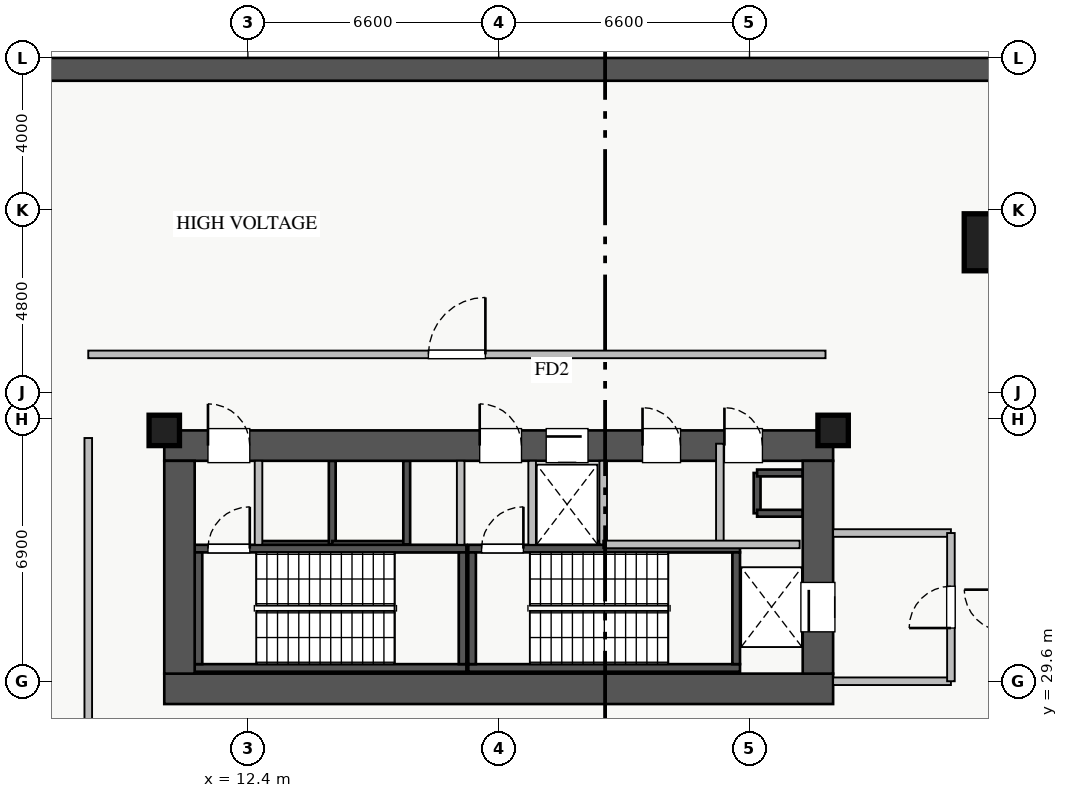
"""IFC4 building model, lengths in metres.
Left out: names, types, materials, properties, quantities, classifications, styles, units other than length and angle.
Written with IfcOpenShell. Run it as: python <this file> out.ifc"""

import sys

from ifc_helpers import new_model, si_unit, direction, frame, frame_2d, origin, origin_2d, place, context, subcontext, project, spatial, rectangle, extrude, source, transform, mapped, element, fill, save


model = new_model("IFC4")
c1 = context("Model", 3, precision=1e-05, world=origin(), true_north=direction((0.0, 1.0)))
c2 = subcontext(c1, "Body", "Model", "MODEL_VIEW")
j1 = project(units=[si_unit("LENGTHUNIT", "METRE"), si_unit("PLANEANGLEUNIT", "RADIAN")], contexts=[c1])
p1 = place(None, origin())
s1 = spatial("IfcSite", under=j1, at=p1, CompositionType="ELEMENT")
p2 = place(p1, origin())
s2 = spatial("IfcBuilding", under=s1, at=p2, CompositionType="ELEMENT")
p3 = place(p2, frame((0.0, 0.0, -9.6)))
s3 = spatial("IfcBuildingStorey", under=s2, at=p3, CompositionType="ELEMENT", Elevation=-9.6)
p4 = place(p3, frame((12.68, 33.2, 0.0), z_axis=(0.0, 0.0, 1.0), x_axis=(1.0, 0.0, 0.0)))
e1 = element("IfcWall", 1, at=p4, inside=s3, PredefinedType="SHEAR", context=c2, shape_type="SweptSolid", body=[
    extrude(rectangle(XDim=1.94, YDim=0.18, at=frame_2d((0.97, 0.0))), origin(), (0.0, 0.0, 1.0), 4.58),
])
p5 = place(p3, frame((14.62, 33.2, 0.0), z_axis=(0.0, 0.0, 1.0), x_axis=(0.0, 1.0, 0.0)))
e2 = element("IfcWall", 2, at=p5, inside=s3, PredefinedType="SHEAR", context=c2, shape_type="SweptSolid", body=[
    extrude(rectangle(XDim=2.2, YDim=0.18, at=frame_2d((1.1, 0.0))), origin(), (0.0, 0.0, 1.0), 4.58),
])
p6 = place(p3, frame((25.8, 34.02, 0.0), z_axis=(0.0, 0.0, 1.0), x_axis=(0.0, 1.0, 0.0)))
e3 = element("IfcWall", 3, at=p6, inside=s3, PredefinedType="SHEAR", context=c2, shape_type="SweptSolid", body=[
    extrude(rectangle(XDim=1.06, YDim=0.18, at=frame_2d((0.53, 0.0))), origin(), (0.0, 0.0, 1.0), 4.58),
])
for number, where, z_axis, x_axis in (
    (4, (25.8, 35.08, 0.0), (0.0, 0.0, 1.0), (1.0, 0.0, 0.0)),
    (5, (25.8, 34.02, 0.0), (0.0, 0.0, 1.0), (1.0, 0.0, 0.0)),
):
    element("IfcWall", number, at=place(p3, frame(where, z_axis=z_axis, x_axis=x_axis)), inside=s3, PredefinedType="SHEAR", context=c2, shape_type="SweptSolid", body=[
        extrude(rectangle(XDim=1.2, YDim=0.18, at=frame_2d((0.6, 0.0))), origin(), (0.0, 0.0, 1.0), 4.58),
    ])
p7 = place(p3, frame((14.62, 33.2, 0.0), z_axis=(0.0, 0.0, 1.0), x_axis=(1.0, 0.0, 0.0)))
e6 = element("IfcWall", 6, at=p7, inside=s3, PredefinedType="SHEAR", context=c2, shape_type="SweptSolid", body=[
    extrude(rectangle(XDim=1.96, YDim=0.18, at=frame_2d((0.98, 0.0))), origin(), (0.0, 0.0, 1.0), 4.58),
])
p8 = place(p3, frame((16.58, 33.2, 0.0), z_axis=(0.0, 0.0, 1.0), x_axis=(0.0, 1.0, 0.0)))
e7 = element("IfcWall", 7, at=p8, inside=s3, PredefinedType="SHEAR", context=c2, shape_type="SweptSolid", body=[
    extrude(rectangle(XDim=2.2, YDim=0.18, at=frame_2d((1.1, 0.0))), origin(), (0.0, 0.0, 1.0), 4.58),
])
p9 = place(p3, frame((19.88, 33.2, 0.0), z_axis=(0.0, 0.0, 1.0), x_axis=(1.0, 0.0, 0.0)))
e8 = element("IfcWall", 8, at=p9, inside=s3, PredefinedType="SHEAR", context=c2, shape_type="SweptSolid", body=[
    extrude(rectangle(XDim=1.87, YDim=0.18, at=frame_2d((0.935, 0.0))), origin(), (0.0, 0.0, 1.0), 4.58),
])
p10 = place(p3, frame((11.0, 29.95, 0.0), z_axis=(0.0, 0.0, 1.0), x_axis=(1.0, 0.0, 0.0)))
e9 = element("IfcWall", 9, at=p10, inside=s3, PredefinedType="SHEAR", context=c2, shape_type="SweptSolid", body=[
    extrude(rectangle(XDim=7.15, YDim=0.2, at=frame_2d((3.575, 0.0))), origin(), (0.0, 0.0, 1.0), 4.8),
])
p11 = place(p3, frame((11.0, 33.09, 0.0), z_axis=(0.0, 0.0, 1.0), x_axis=(1.0, 0.0, 0.0)))
e10 = element("IfcWall", 10, at=p11, inside=s3, PredefinedType="SHEAR", context=c2, shape_type="SweptSolid", body=[
    extrude(rectangle(XDim=7.15, YDim=0.2, at=frame_2d((3.575, 0.0))), origin(), (0.0, 0.0, 1.0), 4.8),
])
p12 = place(p11, frame((0.35, 0.0, 0.0)))
e11 = element("IfcOpeningElement", 11, at=p12, cuts=e10, PredefinedType="OPENING", context=c2, shape_type="SweptSolid", body=[
    extrude(rectangle(XDim=1.1, YDim=2.05, at=frame_2d((0.55, 1.025))), frame((0.0, 0.11, 0.0), z_axis=(0.0, -1.0, 0.0), x_axis=(1.0, 0.0, 0.0)), (0.0, 0.0, 1.0), 0.22),
])
for number, where, z_axis, x_axis in (
    (12, (11.1, 30.05, 0.0), (0.0, 0.0, 1.0), (0.0, 1.0, 0.0)),
    (13, (18.05, 30.05, 0.0), (0.0, 0.0, 1.0), (0.0, 1.0, 0.0)),
):
    element("IfcWall", number, at=place(p3, frame(where, z_axis=z_axis, x_axis=x_axis)), inside=s3, PredefinedType="SHEAR", context=c2, shape_type="SweptSolid", body=[
        extrude(rectangle(XDim=2.94, YDim=0.2, at=frame_2d((1.47, 0.0))), origin(), (0.0, 0.0, 1.0), 4.8),
    ])
p13 = place(p3, frame((18.2, 29.95, 0.0), z_axis=(0.0, 0.0, 1.0), x_axis=(1.0, 0.0, 0.0)))
e14 = element("IfcWall", 14, at=p13, inside=s3, PredefinedType="SHEAR", context=c2, shape_type="SweptSolid", body=[
    extrude(rectangle(XDim=7.15, YDim=0.2, at=frame_2d((3.575, 0.0))), origin(), (0.0, 0.0, 1.0), 4.8),
])
p14 = place(p3, frame((18.2, 33.09, 0.0), z_axis=(0.0, 0.0, 1.0), x_axis=(1.0, 0.0, 0.0)))
e15 = element("IfcWall", 15, at=p14, inside=s3, PredefinedType="SHEAR", context=c2, shape_type="SweptSolid", body=[
    extrude(rectangle(XDim=7.15, YDim=0.2, at=frame_2d((3.575, 0.0))), origin(), (0.0, 0.0, 1.0), 4.8),
])
p15 = place(p14, frame((0.35, 0.0, 0.0)))
e16 = element("IfcOpeningElement", 16, at=p15, cuts=e15, PredefinedType="OPENING", context=c2, shape_type="SweptSolid", body=[
    extrude(rectangle(XDim=1.1, YDim=2.05, at=frame_2d((0.55, 1.025))), frame((0.0, 0.11, 0.0), z_axis=(0.0, -1.0, 0.0), x_axis=(1.0, 0.0, 0.0)), (0.0, 0.0, 1.0), 0.22),
])
for number, where, z_axis, x_axis in (
    (17, (18.3, 30.05, 0.0), (0.0, 0.0, 1.0), (0.0, 1.0, 0.0)),
    (18, (25.25, 30.05, 0.0), (0.0, 0.0, 1.0), (0.0, 1.0, 0.0)),
):
    element("IfcWall", number, at=place(p3, frame(where, z_axis=z_axis, x_axis=x_axis)), inside=s3, PredefinedType="SHEAR", context=c2, shape_type="SweptSolid", body=[
        extrude(rectangle(XDim=2.94, YDim=0.2, at=frame_2d((1.47, 0.0))), origin(), (0.0, 0.0, 1.0), 4.8),
    ])
p16 = place(p3, frame((0.0, 45.7, 0.0), z_axis=(0.0, 0.0, 1.0), x_axis=(1.0, 0.0, 0.0)))
e19 = element("IfcWall", 19, at=p16, inside=s3, PredefinedType="SOLIDWALL", context=c2, shape_type="SweptSolid", body=[
    extrude(rectangle(XDim=74.0, YDim=0.6, at=frame_2d((37.0, 0.0))), origin(), (0.0, 0.0, 1.0), 4.8),
])
p17 = place(p3, frame((10.2, 29.4, 0.0), z_axis=(0.0, 0.0, 1.0), x_axis=(1.0, 0.0, 0.0)))
e20 = element("IfcWall", 20, at=p17, inside=s3, PredefinedType="SHEAR", context=c2, shape_type="SweptSolid", body=[
    extrude(rectangle(XDim=17.6, YDim=0.8, at=frame_2d((8.8, 0.0))), origin(), (0.0, 0.0, 1.0), 4.8),
])
p18 = place(p3, frame((10.2, 35.8, 0.0), z_axis=(0.0, 0.0, 1.0), x_axis=(1.0, 0.0, 0.0)))
e21 = element("IfcWall", 21, at=p18, inside=s3, PredefinedType="SHEAR", context=c2, shape_type="SweptSolid", body=[
    extrude(rectangle(XDim=17.6, YDim=0.8, at=frame_2d((8.8, 0.0))), origin(), (0.0, 0.0, 1.0), 4.8),
])
p19 = place(p18, frame((1.15, 0.0, 0.0)))
e22 = element("IfcOpeningElement", 22, at=p19, cuts=e21, PredefinedType="OPENING", context=c2, shape_type="SweptSolid", body=[
    extrude(rectangle(XDim=1.1, YDim=2.05, at=frame_2d((0.55, 1.025))), frame((0.0, 0.41, 0.0), z_axis=(0.0, -1.0, 0.0), x_axis=(1.0, 0.0, 0.0)), (0.0, 0.0, 1.0), 0.82),
])
p20 = place(p18, frame((8.3, 0.0, 0.0)))
e23 = element("IfcOpeningElement", 23, at=p20, cuts=e21, PredefinedType="OPENING", context=c2, shape_type="SweptSolid", body=[
    extrude(rectangle(XDim=1.1, YDim=2.05, at=frame_2d((0.55, 1.025))), frame((0.0, 0.41, 0.0), z_axis=(0.0, -1.0, 0.0), x_axis=(1.0, 0.0, 0.0)), (0.0, 0.0, 1.0), 0.82),
])
p21 = place(p18, frame((10.05, 0.0, 0.0)))
e24 = element("IfcOpeningElement", 24, at=p21, cuts=e21, PredefinedType="OPENING", context=c2, shape_type="SweptSolid", body=[
    extrude(rectangle(XDim=1.1, YDim=2.05, at=frame_2d((0.55, 1.025))), frame((0.0, 0.41, 0.0), z_axis=(0.0, -1.0, 0.0), x_axis=(1.0, 0.0, 0.0)), (0.0, 0.0, 1.0), 0.82),
])
p22 = place(p18, frame((14.74, 0.0, 0.0)))
e25 = element("IfcOpeningElement", 25, at=p22, cuts=e21, PredefinedType="OPENING", context=c2, shape_type="SweptSolid", body=[
    extrude(rectangle(XDim=1.0, YDim=2.05, at=frame_2d((0.5, 1.025))), frame((0.0, 0.41, 0.0), z_axis=(0.0, -1.0, 0.0), x_axis=(1.0, 0.0, 0.0)), (0.0, 0.0, 1.0), 0.82),
])
p23 = place(p18, frame((12.585, 0.0, 0.0)))
e26 = element("IfcOpeningElement", 26, at=p23, cuts=e21, PredefinedType="OPENING", context=c2, shape_type="SweptSolid", body=[
    extrude(rectangle(XDim=1.0, YDim=2.05, at=frame_2d((0.5, 1.025))), frame((0.0, 0.41, 0.0), z_axis=(0.0, -1.0, 0.0), x_axis=(1.0, 0.0, 0.0)), (0.0, 0.0, 1.0), 0.82),
])
p24 = place(p3, frame((10.6, 29.8, 0.0), z_axis=(0.0, 0.0, 1.0), x_axis=(0.0, 1.0, 0.0)))
e27 = element("IfcWall", 27, at=p24, inside=s3, PredefinedType="SHEAR", context=c2, shape_type="SweptSolid", body=[
    extrude(rectangle(XDim=5.6, YDim=0.8, at=frame_2d((2.8, 0.0))), origin(), (0.0, 0.0, 1.0), 4.8),
])
p25 = place(p3, frame((27.4, 29.8, 0.0), z_axis=(0.0, 0.0, 1.0), x_axis=(0.0, 1.0, 0.0)))
e28 = element("IfcWall", 28, at=p25, inside=s3, PredefinedType="SHEAR", context=c2, shape_type="SweptSolid", body=[
    extrude(rectangle(XDim=5.6, YDim=0.8, at=frame_2d((2.8, 0.0))), origin(), (0.0, 0.0, 1.0), 4.8),
])
p26 = place(p25, frame((1.1, 0.0, 0.0)))
e29 = element("IfcOpeningElement", 29, at=p26, cuts=e28, PredefinedType="OPENING", context=c2, shape_type="SweptSolid", body=[
    extrude(rectangle(XDim=1.3, YDim=2.05, at=frame_2d((0.65, 1.025))), frame((0.0, 0.41, 0.0), z_axis=(0.0, -1.0, 0.0), x_axis=(1.0, 0.0, 0.0)), (0.0, 0.0, 1.0), 0.82),
])
m1 = source(origin(), c2, "Body", "SweptSolid", [
    extrude(rectangle(XDim=1.5, YDim=1.5, at=origin_2d()), origin(), (0.0, 0.0, 1.0), 4.8),
])
p27 = place(p3, frame((32.0, 41.15, 0.0), z_axis=(0.0, 0.0, 1.0), x_axis=(1.0, 0.0, 0.0)))
e30 = element("IfcColumn", 30, at=p27, inside=s3, PredefinedType="COLUMN", context=c2, shape_type="MappedRepresentation", body=[
    mapped(m1, transform((0.0, 0.0, 0.0), x_axis=(1.0, 0.0, 0.0), y_axis=(0.0, 1.0, 0.0), z_axis=(0.0, 0.0, 1.0), scale=1.0)),
])
m2 = source(origin(), c2, "Body", "SweptSolid", [
    extrude(rectangle(XDim=0.8, YDim=0.8, at=origin_2d()), origin(), (0.0, 0.0, 1.0), 4.8),
])
for number, where, z_axis, x_axis in (
    (31, (10.2, 36.2, 0.0), (0.0, 0.0, 1.0), (1.0, 0.0, 0.0)),
    (32, (27.8, 36.2, 0.0), (0.0, 0.0, 1.0), (1.0, 0.0, 0.0)),
):
    element("IfcColumn", number, at=place(p3, frame(where, z_axis=z_axis, x_axis=x_axis)), inside=s3, PredefinedType="PILASTER", context=c2, shape_type="MappedRepresentation", body=[
        mapped(m2, transform((0.0, 0.0, 0.0), x_axis=(1.0, 0.0, 0.0), y_axis=(0.0, 1.0, 0.0), z_axis=(0.0, 0.0, 1.0), scale=1.0)),
    ])
p28 = place(p3, frame((27.8, 29.6, 0.0), z_axis=(0.0, 0.0, 1.0), x_axis=(1.0, 0.0, 0.0)))
e33 = element("IfcWall", 33, at=p28, inside=s3, PredefinedType="PARTITIONING", context=c2, shape_type="SweptSolid", body=[
    extrude(rectangle(XDim=3.1, YDim=0.2, at=frame_2d((1.55, 0.0))), origin(), (0.0, 0.0, 1.0), 3.875),
])
p29 = place(p3, frame((27.8, 33.5, 0.0), z_axis=(0.0, 0.0, 1.0), x_axis=(1.0, 0.0, 0.0)))
e34 = element("IfcWall", 34, at=p29, inside=s3, PredefinedType="PARTITIONING", context=c2, shape_type="SweptSolid", body=[
    extrude(rectangle(XDim=3.1, YDim=0.2, at=frame_2d((1.55, 0.0))), origin(), (0.0, 0.0, 1.0), 3.575),
])
p30 = place(p3, frame((30.9, 29.6, 0.0), z_axis=(0.0, 0.0, 1.0), x_axis=(0.0, 1.0, 0.0)))
e35 = element("IfcWall", 35, at=p30, inside=s3, PredefinedType="PARTITIONING", context=c2, shape_type="SweptSolid", body=[
    extrude(rectangle(XDim=3.9, YDim=0.2, at=frame_2d((1.95, 0.0))), origin(), (0.0, 0.0, 1.0), 4.58),
])
p31 = place(p30, frame((1.4, 0.0, 0.0)))
e36 = element("IfcOpeningElement", 36, at=p31, cuts=e35, PredefinedType="OPENING", context=c2, shape_type="SweptSolid", body=[
    extrude(rectangle(XDim=1.1, YDim=2.05, at=frame_2d((0.55, 1.025))), frame((0.0, 0.11, 0.0), z_axis=(0.0, -1.0, 0.0), x_axis=(1.0, 0.0, 0.0)), (0.0, 0.0, 1.0), 0.22),
])
for number, where, z_axis, x_axis in (
    (37, (12.68, 33.19, 0.0), (0.0, 0.0, 1.0), (0.0, 1.0, 0.0)),
    (38, (18.0, 33.19, 0.0), (0.0, 0.0, 1.0), (0.0, 1.0, 0.0)),
    (39, (19.88, 33.19, 0.0), (0.0, 0.0, 1.0), (0.0, 1.0, 0.0)),
):
    element("IfcWall", number, at=place(p3, frame(where, z_axis=z_axis, x_axis=x_axis)), inside=s3, PredefinedType="PARTITIONING", context=c2, shape_type="SweptSolid", body=[
        extrude(rectangle(XDim=2.21, YDim=0.2, at=frame_2d((1.105, 0.0))), origin(), (0.0, 0.0, 1.0), 4.58),
    ])
p32 = place(p3, frame((24.82, 33.2, 0.0), z_axis=(0.0, 0.0, 1.0), x_axis=(0.0, 1.0, 0.0)))
e40 = element("IfcWall", 40, at=p32, inside=s3, PredefinedType="PARTITIONING", context=c2, shape_type="SweptSolid", body=[
    extrude(rectangle(XDim=2.65, YDim=0.2, at=frame_2d((1.325, 0.0))), origin(), (0.0, 0.0, 1.0), 4.58),
])
p33 = place(p3, frame((21.75, 33.2, 0.0), z_axis=(0.0, 0.0, 1.0), x_axis=(0.0, 1.0, 0.0)))
e41 = element("IfcWall", 41, at=p33, inside=s3, PredefinedType="PARTITIONING", context=c2, shape_type="SweptSolid", body=[
    extrude(rectangle(XDim=2.2, YDim=0.2, at=frame_2d((1.1, 0.0))), origin(), (0.0, 0.0, 1.0), 4.58),
])
p34 = place(p3, frame((21.75, 33.2, 0.0), z_axis=(0.0, 0.0, 1.0), x_axis=(1.0, 0.0, 0.0)))
e42 = element("IfcWall", 42, at=p34, inside=s3, PredefinedType="PARTITIONING", context=c2, shape_type="SweptSolid", body=[
    extrude(rectangle(XDim=5.17, YDim=0.2, at=frame_2d((2.585, 0.0))), origin(), (0.0, 0.0, 1.0), 4.58),
])
p35 = place(p3, frame((8.2, 10.0, 0.0), z_axis=(0.0, 0.0, 1.0), x_axis=(0.0, 1.0, 0.0)))
e43 = element("IfcWall", 43, at=p35, inside=s3, PredefinedType="PARTITIONING", context=c2, shape_type="SweptSolid", body=[
    extrude(rectangle(XDim=26.0, YDim=0.2, at=frame_2d((13.0, 0.0))), origin(), (0.0, 0.0, 1.0), 4.58),
])
p36 = place(p35, frame((12.25, 0.0, 0.0)))
e44 = element("IfcOpeningElement", 44, at=p36, cuts=e43, PredefinedType="OPENING", context=c2, shape_type="SweptSolid", body=[
    extrude(rectangle(XDim=1.5, YDim=2.05, at=frame_2d((0.75, 1.025))), frame((0.0, 0.11, 0.0), z_axis=(0.0, -1.0, 0.0), x_axis=(1.0, 0.0, 0.0)), (0.0, 0.0, 1.0), 0.22),
])
p37 = place(p3, frame((8.2, 38.2, 0.0), z_axis=(0.0, 0.0, 1.0), x_axis=(1.0, 0.0, 0.0)))
e45 = element("IfcWall", 45, at=p37, inside=s3, PredefinedType="PARTITIONING", context=c2, shape_type="SweptSolid", body=[
    extrude(rectangle(XDim=19.4, YDim=0.2, at=frame_2d((9.7, 0.0))), origin(), (0.0, 0.0, 1.0), 4.58),
])
p38 = place(p37, frame((8.95, 0.0, 0.0)))
e46 = element("IfcOpeningElement", 46, at=p38, cuts=e45, PredefinedType="OPENING", context=c2, shape_type="SweptSolid", body=[
    extrude(rectangle(XDim=1.5, YDim=2.05, at=frame_2d((0.75, 1.025))), frame((0.0, 0.11, 0.0), z_axis=(0.0, -1.0, 0.0), x_axis=(1.0, 0.0, 0.0)), (0.0, 0.0, 1.0), 0.22),
])
m3 = source(origin(), c2, "Body", "SweptSolid", [
    extrude(rectangle(XDim=1.3, YDim=2.05, at=frame_2d((0.65, 1.025))), frame((0.0, 0.025, 0.0), z_axis=(0.0, -1.0, 0.0), x_axis=(1.0, 0.0, 0.0)), (0.0, 0.0, 1.0), 0.05),
])
p39 = place(p26, origin())
e47 = element("IfcDoor", 47, at=p39, inside=s3, OperationType="SLIDING_TO_LEFT", PredefinedType="DOOR", context=c2, shape_type="MappedRepresentation", body=[
    mapped(m3, transform((0.0, 0.0, 0.0), x_axis=(1.0, 0.0, 0.0), y_axis=(0.0, 1.0, 0.0), z_axis=(0.0, 0.0, 1.0), scale=1.0)),
])
fill(e29, e47)
m4 = source(origin(), c2, "Body", "SweptSolid", [
    extrude(rectangle(XDim=1.1, YDim=2.05, at=frame_2d((0.55, 1.025))), frame((0.0, 0.025, 0.0), z_axis=(0.0, -1.0, 0.0), x_axis=(1.0, 0.0, 0.0)), (0.0, 0.0, 1.0), 0.05),
])
p40 = place(p19, origin())
e48 = element("IfcDoor", 48, at=p40, inside=s3, OperationType="SINGLE_SWING_LEFT", PredefinedType="DOOR", context=c2, shape_type="MappedRepresentation", body=[
    mapped(m4, transform((0.0, 0.0, 0.0), x_axis=(1.0, 0.0, 0.0), y_axis=(0.0, 1.0, 0.0), z_axis=(0.0, 0.0, 1.0), scale=1.0)),
])
fill(e22, e48)
p41 = place(p12, origin())
e49 = element("IfcDoor", 49, at=p41, inside=s3, OperationType="SINGLE_SWING_RIGHT", PredefinedType="DOOR", context=c2, shape_type="MappedRepresentation", body=[
    mapped(m4, transform((0.0, 0.0, 0.0), x_axis=(1.0, 0.0, 0.0), y_axis=(0.0, 1.0, 0.0), z_axis=(0.0, 0.0, 1.0), scale=1.0)),
])
fill(e11, e49)
p42 = place(p20, origin())
e50 = element("IfcDoor", 50, at=p42, inside=s3, OperationType="SINGLE_SWING_LEFT", PredefinedType="DOOR", context=c2, shape_type="MappedRepresentation", body=[
    mapped(m4, transform((0.0, 0.0, 0.0), x_axis=(1.0, 0.0, 0.0), y_axis=(0.0, 1.0, 0.0), z_axis=(0.0, 0.0, 1.0), scale=1.0)),
])
fill(e23, e50)
p43 = place(p15, origin())
e51 = element("IfcDoor", 51, at=p43, inside=s3, OperationType="SINGLE_SWING_RIGHT", PredefinedType="DOOR", context=c2, shape_type="MappedRepresentation", body=[
    mapped(m4, transform((0.0, 0.0, 0.0), x_axis=(1.0, 0.0, 0.0), y_axis=(0.0, 1.0, 0.0), z_axis=(0.0, 0.0, 1.0), scale=1.0)),
])
fill(e16, e51)
p44 = place(p21, origin())
e52 = element("IfcDoor", 52, at=p44, inside=s3, OperationType="SLIDING_TO_LEFT", PredefinedType="DOOR", context=c2, shape_type="MappedRepresentation", body=[
    mapped(m4, transform((0.0, 0.0, 0.0), x_axis=(1.0, 0.0, 0.0), y_axis=(0.0, 1.0, 0.0), z_axis=(0.0, 0.0, 1.0), scale=1.0)),
])
fill(e24, e52)
m5 = source(origin(), c2, "Body", "SweptSolid", [
    extrude(rectangle(XDim=1.0, YDim=2.05, at=frame_2d((0.5, 1.025))), frame((0.0, 0.025, 0.0), z_axis=(0.0, -1.0, 0.0), x_axis=(1.0, 0.0, 0.0)), (0.0, 0.0, 1.0), 0.05),
])
p45 = place(p22, origin())
e53 = element("IfcDoor", 53, at=p45, inside=s3, OperationType="SINGLE_SWING_LEFT", PredefinedType="DOOR", context=c2, shape_type="MappedRepresentation", body=[
    mapped(m5, transform((0.0, 0.0, 0.0), x_axis=(1.0, 0.0, 0.0), y_axis=(0.0, 1.0, 0.0), z_axis=(0.0, 0.0, 1.0), scale=1.0)),
])
fill(e25, e53)
p46 = place(p23, origin())
e54 = element("IfcDoor", 54, at=p46, inside=s3, OperationType="SINGLE_SWING_LEFT", PredefinedType="DOOR", context=c2, shape_type="MappedRepresentation", body=[
    mapped(m5, transform((0.0, 0.0, 0.0), x_axis=(1.0, 0.0, 0.0), y_axis=(0.0, 1.0, 0.0), z_axis=(0.0, 0.0, 1.0), scale=1.0)),
])
fill(e26, e54)
p47 = place(p31, origin())
e55 = element("IfcDoor", 55, at=p47, inside=s3, OperationType="SINGLE_SWING_LEFT", PredefinedType="DOOR", context=c2, shape_type="MappedRepresentation", body=[
    mapped(m4, transform((0.0, 0.0, 0.0), x_axis=(1.0, 0.0, 0.0), y_axis=(0.0, 1.0, 0.0), z_axis=(0.0, 0.0, 1.0), scale=1.0)),
])
fill(e36, e55)
m6 = source(origin(), c2, "Body", "SweptSolid", [
    extrude(rectangle(XDim=1.5, YDim=2.05, at=frame_2d((0.75, 1.025))), frame((0.0, 0.025, 0.0), z_axis=(0.0, -1.0, 0.0), x_axis=(1.0, 0.0, 0.0)), (0.0, 0.0, 1.0), 0.05),
])
p48 = place(p38, origin())
e56 = element("IfcDoor", 56, at=p48, inside=s3, OperationType="SINGLE_SWING_RIGHT", PredefinedType="DOOR", context=c2, shape_type="MappedRepresentation", body=[
    mapped(m6, transform((0.0, 0.0, 0.0), x_axis=(1.0, 0.0, 0.0), y_axis=(0.0, 1.0, 0.0), z_axis=(0.0, 0.0, 1.0), scale=1.0)),
])
fill(e46, e56)
save(model, sys.argv[1])
